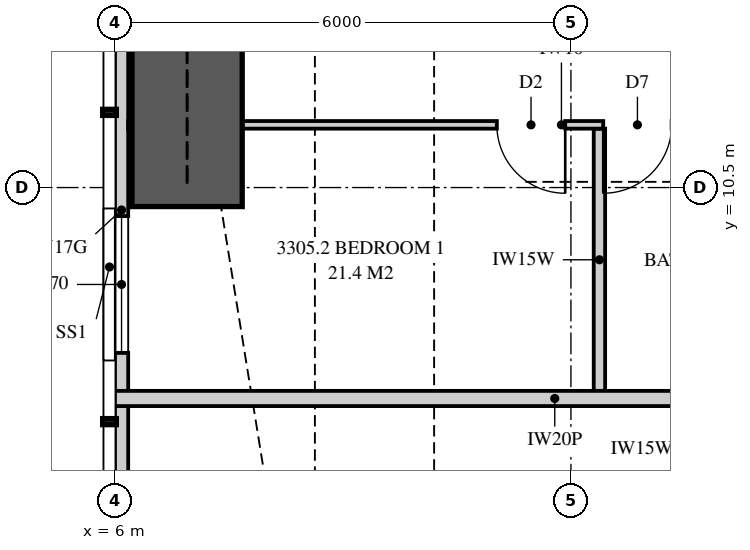
"""IFC4 building model, lengths in metres.
Left out: names, types, materials, properties, quantities, classifications, styles, units other than length and angle.
Written with IfcOpenShell. Run it as: python <this file> out.ifc"""

import sys

from ifc_helpers import new_model, si_unit, direction, frame, frame_2d, origin, place, context, subcontext, project, spatial, polyline, rectangle, outline, extrude, element, fill, save


model = new_model("IFC4")
c1 = context("Model", 3, precision=1e-05, world=origin(), true_north=direction((0.0, 1.0)))
c2 = subcontext(c1, "Body", "Model", "MODEL_VIEW")
j1 = project(units=[si_unit("LENGTHUNIT", "METRE"), si_unit("PLANEANGLEUNIT", "RADIAN")], contexts=[c1])
p1 = place(None, origin())
s1 = spatial("IfcSite", under=j1, at=p1, CompositionType="ELEMENT")
p2 = place(p1, origin())
s2 = spatial("IfcBuilding", under=s1, at=p2, CompositionType="ELEMENT")
p3 = place(p2, frame((0.0, 0.0, 121.6)))
s3 = spatial("IfcBuildingStorey", under=s2, at=p3, CompositionType="ELEMENT", Elevation=121.6)
p4 = place(p3, frame((6.087, 17.358, 0.0), z_axis=(0.0, 0.0, 1.0), x_axis=(0.0, -1.0, 0.0)))
e1 = element("IfcWall", 1, at=p4, inside=s3, PredefinedType="SOLIDWALL", context=c2, shape_type="SweptSolid", body=[
    extrude(outline(polyline([(0.0, 0.0), (14.307, 0.0), (14.307, 3.11), (4.577, 3.11), (4.577, 2.15), (4.484, 2.15), (4.484, 3.11), (4.358, 3.11), (4.358, 2.15), (0.0, 2.15), (0.0, 0.0)])), frame((0.0, 0.087, 0.0), z_axis=(0.0, -1.0, 0.0), x_axis=(1.0, 0.0, 0.0)), (0.0, 0.0, 1.0), 0.175),
])
p5 = place(p4, frame((0.3, 0.0, 0.4)))
e2 = element("IfcOpeningElement", 2, at=p5, cuts=e1, PredefinedType="OPENING", context=c2, shape_type="SweptSolid", body=[
    extrude(rectangle(XDim=1.2, YDim=1.7, at=frame_2d((0.6, 0.85))), frame((0.0, 0.097, 0.0), z_axis=(0.0, -1.0, 0.0), x_axis=(1.0, 0.0, 0.0)), (0.0, 0.0, 1.0), 0.195),
])
p6 = place(p4, frame((7.233, 0.0, 0.4)))
e3 = element("IfcOpeningElement", 3, at=p6, cuts=e1, PredefinedType="OPENING", context=c2, shape_type="SweptSolid", body=[
    extrude(rectangle(XDim=1.8, YDim=1.7, at=frame_2d((0.9, 0.85))), frame((0.0, 0.097, 0.0), z_axis=(0.0, -1.0, 0.0), x_axis=(1.0, 0.0, 0.0)), (0.0, 0.0, 1.0), 0.195),
])
p7 = place(p3, frame((6.0, 7.725, 0.0), z_axis=(0.0, 0.0, 1.0), x_axis=(1.0, 0.0, 0.0)))
e4 = element("IfcWall", 4, at=p7, inside=s3, PredefinedType="PARTITIONING", context=c2, shape_type="SweptSolid", body=[
    extrude(outline(polyline([(0.0, 0.0), (11.575, 0.0), (11.575, 3.11), (11.212, 3.11), (11.212, 2.541), (10.538, 2.541), (10.538, 3.11), (5.51, 3.11), (5.51, 2.51), (2.969, 2.51), (2.969, 2.541), (2.727, 2.541), (2.727, 2.15), (0.884, 2.15), (0.884, 3.11), (0.0, 3.11), (0.0, 0.0)])), frame((0.0, 0.1, 0.0), z_axis=(0.0, -1.0, 0.0), x_axis=(1.0, 0.0, 0.0)), (0.0, 0.0, 1.0), 0.2),
])
p8 = place(p3, frame((6.175, 11.325, 0.0), z_axis=(0.0, 0.0, 1.0), x_axis=(1.0, 0.0, 0.0)))
e5 = element("IfcWall", 5, at=p8, inside=s3, PredefinedType="PARTITIONING", context=c2, shape_type="SweptSolid", body=[
    extrude(outline(polyline([(0.175, 3.11), (0.0, 3.11), (0.0, 0.0), (0.529, 0.0), (0.529, 0.325), (1.021, 0.325), (1.021, 0.0), (11.4, 0.0), (11.4, 3.11), (5.285, 3.11), (5.285, 2.51), (2.765, 2.51), (2.765, 3.11), (2.744, 3.11), (2.744, 2.541), (2.169, 2.541), (2.169, 3.11), (1.918, 3.11), (1.918, 2.15), (1.021, 2.15), (1.021, 1.825), (0.529, 1.825), (0.529, 2.15), (0.175, 2.15), (0.175, 3.11)])), frame((0.0, 0.05, 0.0), z_axis=(0.0, -1.0, 0.0), x_axis=(1.0, 0.0, 0.0)), (0.0, 0.0, 1.0), 0.1),
])
p9 = place(p8, frame((4.85, 0.0, 0.0)))
e6 = element("IfcOpeningElement", 6, at=p9, cuts=e5, PredefinedType="OPENING", context=c2, shape_type="SweptSolid", body=[
    extrude(rectangle(XDim=0.9, YDim=2.1, at=frame_2d((0.45, 1.05))), frame((0.0, 0.06, 0.0), z_axis=(0.0, -1.0, 0.0), x_axis=(1.0, 0.0, 0.0)), (0.0, 0.0, 1.0), 0.12),
])
p10 = place(p8, frame((6.25, 0.0, 0.0)))
e7 = element("IfcOpeningElement", 7, at=p10, cuts=e5, PredefinedType="OPENING", context=c2, shape_type="SweptSolid", body=[
    extrude(rectangle(XDim=0.9, YDim=2.1, at=frame_2d((0.45, 1.05))), frame((0.0, 0.06, 0.0), z_axis=(0.0, -1.0, 0.0), x_axis=(1.0, 0.0, 0.0)), (0.0, 0.0, 1.0), 0.12),
])
p11 = place(p8, frame((9.7, 0.0, 0.0)))
e8 = element("IfcOpeningElement", 8, at=p11, cuts=e5, PredefinedType="OPENING", context=c2, shape_type="SweptSolid", body=[
    extrude(rectangle(XDim=0.7, YDim=2.1, at=frame_2d((0.35, 1.05))), frame((0.0, 0.06, 0.0), z_axis=(0.0, -1.0, 0.0), x_axis=(1.0, 0.0, 0.0)), (0.0, 0.0, 1.0), 0.12),
])
p12 = place(p3, frame((12.375, 7.825, 0.0), z_axis=(0.0, 0.0, 1.0), x_axis=(0.0, 1.0, 0.0)))
e9 = element("IfcWall", 9, at=p12, inside=s3, PredefinedType="PLUMBINGWALL", context=c2, shape_type="SweptSolid", body=[
    extrude(outline(polyline([(0.0, 0.0), (3.45, 0.0), (3.45, 3.11), (3.062, 3.11), (3.062, 2.541), (2.438, 2.541), (2.438, 3.11), (0.0, 3.11), (0.0, 0.0)])), frame((0.0, 0.075, 0.0), z_axis=(0.0, -1.0, 0.0), x_axis=(1.0, 0.0, 0.0)), (0.0, 0.0, 1.0), 0.15),
])
p13 = place(p3, frame((6.95, 10.25, 0.0), z_axis=(0.0, 0.0, 1.0), x_axis=(0.0, 1.0, 0.0)))
e10 = element("IfcWall", 10, at=p13, inside=s3, PredefinedType="SHEAR", context=c2, shape_type="SweptSolid", body=[
    extrude(rectangle(XDim=5.5, YDim=1.45, at=frame_2d((2.75, 0.0))), origin(), (0.0, 0.0, 1.0), 3.35),
])
p14 = place(p6, origin())
e11 = element("IfcWindow", 11, at=p14, inside=s3, PartitioningType="SINGLE_PANEL", PredefinedType="WINDOW", context=c2, shape_type="SweptSolid", body=[
    extrude(rectangle(XDim=1.8, YDim=1.7, at=frame_2d((0.9, 0.85))), frame((0.0, 0.03, 0.0), z_axis=(0.0, -1.0, 0.0), x_axis=(1.0, 0.0, 0.0)), (0.0, 0.0, 1.0), 0.06),
])
fill(e3, e11)
p15 = place(p9, frame((0.9, 0.0, 0.0), z_axis=(0.0, 0.0, 1.0), x_axis=(-1.0, 0.0, 0.0)))
e12 = element("IfcDoor", 12, at=p15, inside=s3, OperationType="SINGLE_SWING_LEFT", PredefinedType="DOOR", context=c2, shape_type="SweptSolid", body=[
    extrude(rectangle(XDim=0.9, YDim=2.1, at=frame_2d((0.45, 1.05))), frame((0.0, 0.025, 0.0), z_axis=(0.0, -1.0, 0.0), x_axis=(1.0, 0.0, 0.0)), (0.0, 0.0, 1.0), 0.05),
])
fill(e6, e12)
p16 = place(p10, frame((0.9, 0.0, 0.0), z_axis=(0.0, 0.0, 1.0), x_axis=(-1.0, 0.0, 0.0)))
e13 = element("IfcDoor", 13, at=p16, inside=s3, OperationType="SINGLE_SWING_RIGHT", PredefinedType="DOOR", context=c2, shape_type="SweptSolid", body=[
    extrude(rectangle(XDim=0.9, YDim=2.1, at=frame_2d((0.45, 1.05))), frame((0.0, 0.025, 0.0), z_axis=(0.0, -1.0, 0.0), x_axis=(1.0, 0.0, 0.0)), (0.0, 0.0, 1.0), 0.05),
])
fill(e7, e13)
save(model, sys.argv[1])
